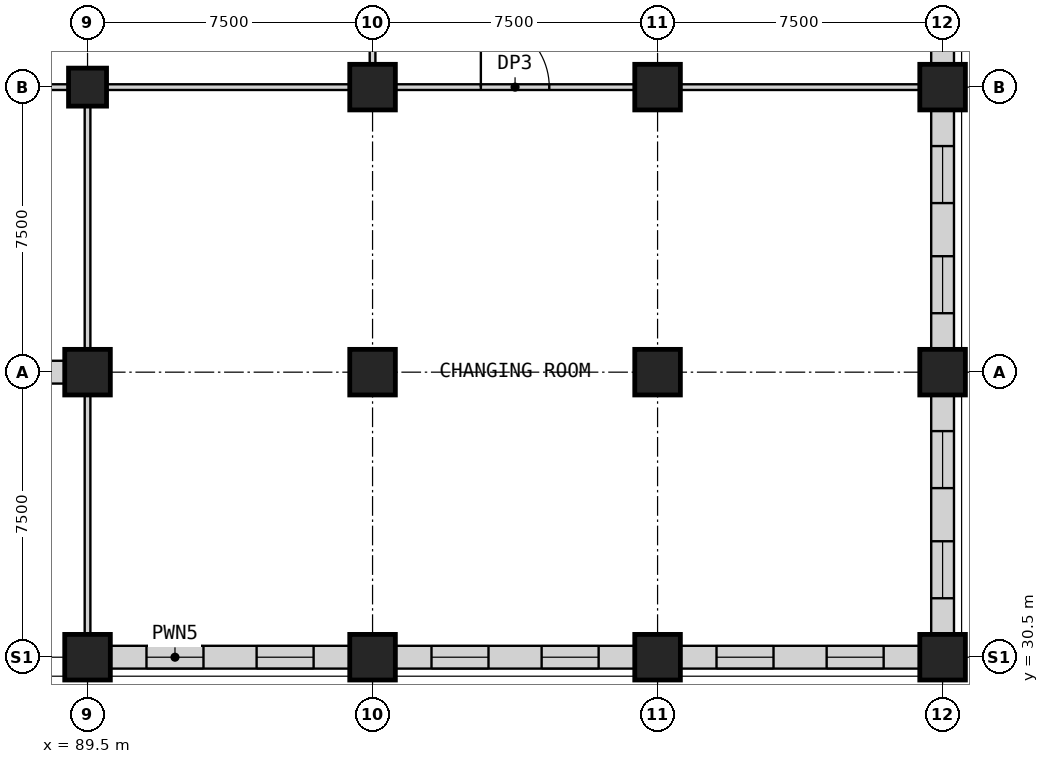
"""IFC4 building model, lengths in metres.
Left out: names, types, materials, properties, quantities, classifications, styles, units other than length and angle.
Written with IfcOpenShell. Run it as: python <this file> out.ifc"""

import sys

from ifc_helpers import new_model, si_unit, direction, frame, frame_2d, origin, origin_2d, place, context, subcontext, project, spatial, rectangle, extrude, element, fill, save


model = new_model("IFC4")
c1 = context("Model", 3, precision=1e-05, world=origin(), true_north=direction((0.0, 1.0)))
c2 = subcontext(c1, "Body", "Model", "MODEL_VIEW")
j1 = project(units=[si_unit("LENGTHUNIT", "METRE"), si_unit("PLANEANGLEUNIT", "RADIAN")], contexts=[c1])
p1 = place(None, origin())
s1 = spatial("IfcSite", under=j1, at=p1, CompositionType="ELEMENT")
p2 = place(p1, origin())
s2 = spatial("IfcBuilding", under=s1, at=p2, CompositionType="ELEMENT")
p3 = place(p2, frame((0.0, 0.0, 29.0)))
s3 = spatial("IfcBuildingStorey", under=s2, at=p3, CompositionType="ELEMENT", Elevation=29.0)
p4 = place(p3, frame((89.5, 45.5, 0.0), z_axis=(0.0, 0.0, 1.0), x_axis=(1.0, 0.0, 0.0)))
e1 = element("IfcColumn", 1, at=p4, inside=s3, PredefinedType="COLUMN", context=c2, shape_type="SweptSolid", body=[
    extrude(rectangle(XDim=1.0, YDim=1.0, at=origin_2d()), origin(), (0.0, 0.0, 1.0), 5.0),
])
for number, where, z_axis, x_axis in (
    (2, (89.5, 30.5, 0.0), (0.0, 0.0, 1.0), (1.0, 0.0, 0.0)),
    (3, (89.5, 38.0, 0.0), (0.0, 0.0, 1.0), (1.0, 0.0, 0.0)),
    (4, (97.0, 30.5, 0.0), (0.0, 0.0, 1.0), (1.0, 0.0, 0.0)),
    (5, (97.0, 38.0, 0.0), (0.0, 0.0, 1.0), (1.0, 0.0, 0.0)),
    (6, (97.0, 45.5, 0.0), (0.0, 0.0, 1.0), (1.0, 0.0, 0.0)),
    (7, (104.5, 30.5, 0.0), (0.0, 0.0, 1.0), (1.0, 0.0, 0.0)),
    (8, (104.5, 38.0, 0.0), (0.0, 0.0, 1.0), (1.0, 0.0, 0.0)),
    (9, (104.5, 45.5, 0.0), (0.0, 0.0, 1.0), (1.0, 0.0, 0.0)),
    (10, (112.0, 30.5, 0.0), (0.0, 0.0, 1.0), (1.0, 0.0, 0.0)),
    (11, (112.0, 38.0, 0.0), (0.0, 0.0, 1.0), (1.0, 0.0, 0.0)),
    (12, (112.0, 45.5, 0.0), (0.0, 0.0, 1.0), (1.0, 0.0, 0.0)),
):
    element("IfcColumn", number, at=place(p3, frame(where, z_axis=z_axis, x_axis=x_axis)), inside=s3, PredefinedType="COLUMN", context=c2, shape_type="SweptSolid", body=[
        extrude(rectangle(XDim=1.2, YDim=1.2, at=origin_2d()), origin(), (0.0, 0.0, 1.0), 5.0),
    ])
p5 = place(p3, frame((90.1, 30.5, 0.0), z_axis=(0.0, 0.0, 1.0), x_axis=(1.0, 0.0, 0.0)))
e13 = element("IfcWall", 13, at=p5, inside=s3, PredefinedType="PARTITIONING", context=c2, shape_type="SweptSolid", body=[
    extrude(rectangle(XDim=6.3, YDim=0.6, at=frame_2d((3.15, 0.0))), origin(), (0.0, 0.0, 1.0), 4.7),
])
p6 = place(p5, frame((0.951, 0.0, 0.9)))
e14 = element("IfcOpeningElement", 14, at=p6, cuts=e13, PredefinedType="OPENING", context=c2, shape_type="SweptSolid", body=[
    extrude(rectangle(XDim=1.5, YDim=2.8, at=frame_2d((0.75, 1.4))), frame((0.0, 0.31, 0.0), z_axis=(0.0, -1.0, 0.0), x_axis=(1.0, 0.0, 0.0)), (0.0, 0.0, 1.0), 0.62),
])
p7 = place(p5, frame((3.849, 0.0, 0.9)))
e15 = element("IfcOpeningElement", 15, at=p7, cuts=e13, PredefinedType="OPENING", context=c2, shape_type="SweptSolid", body=[
    extrude(rectangle(XDim=1.5, YDim=2.8, at=frame_2d((0.75, 1.4))), frame((0.0, 0.31, 0.0), z_axis=(0.0, -1.0, 0.0), x_axis=(1.0, 0.0, 0.0)), (0.0, 0.0, 1.0), 0.62),
])
p8 = place(p3, frame((97.6, 30.5, 0.0), z_axis=(0.0, 0.0, 1.0), x_axis=(1.0, 0.0, 0.0)))
e16 = element("IfcWall", 16, at=p8, inside=s3, PredefinedType="PARTITIONING", context=c2, shape_type="SweptSolid", body=[
    extrude(rectangle(XDim=6.3, YDim=0.6, at=frame_2d((3.15, 0.0))), origin(), (0.0, 0.0, 1.0), 4.7),
])
p9 = place(p8, frame((0.951, 0.0, 0.9)))
e17 = element("IfcOpeningElement", 17, at=p9, cuts=e16, PredefinedType="OPENING", context=c2, shape_type="SweptSolid", body=[
    extrude(rectangle(XDim=1.5, YDim=2.8, at=frame_2d((0.75, 1.4))), frame((0.0, 0.31, 0.0), z_axis=(0.0, -1.0, 0.0), x_axis=(1.0, 0.0, 0.0)), (0.0, 0.0, 1.0), 0.62),
])
p10 = place(p8, frame((3.849, 0.0, 0.9)))
e18 = element("IfcOpeningElement", 18, at=p10, cuts=e16, PredefinedType="OPENING", context=c2, shape_type="SweptSolid", body=[
    extrude(rectangle(XDim=1.5, YDim=2.8, at=frame_2d((0.75, 1.4))), frame((0.0, 0.31, 0.0), z_axis=(0.0, -1.0, 0.0), x_axis=(1.0, 0.0, 0.0)), (0.0, 0.0, 1.0), 0.62),
])
p11 = place(p3, frame((105.1, 30.5, 0.0), z_axis=(0.0, 0.0, 1.0), x_axis=(1.0, 0.0, 0.0)))
e19 = element("IfcWall", 19, at=p11, inside=s3, PredefinedType="PARTITIONING", context=c2, shape_type="SweptSolid", body=[
    extrude(rectangle(XDim=6.3, YDim=0.6, at=frame_2d((3.15, 0.0))), origin(), (0.0, 0.0, 1.0), 4.7),
])
p12 = place(p11, frame((0.951, 0.0, 0.9)))
e20 = element("IfcOpeningElement", 20, at=p12, cuts=e19, PredefinedType="OPENING", context=c2, shape_type="SweptSolid", body=[
    extrude(rectangle(XDim=1.5, YDim=2.8, at=frame_2d((0.75, 1.4))), frame((0.0, 0.31, 0.0), z_axis=(0.0, -1.0, 0.0), x_axis=(1.0, 0.0, 0.0)), (0.0, 0.0, 1.0), 0.62),
])
p13 = place(p11, frame((3.849, 0.0, 0.9)))
e21 = element("IfcOpeningElement", 21, at=p13, cuts=e19, PredefinedType="OPENING", context=c2, shape_type="SweptSolid", body=[
    extrude(rectangle(XDim=1.5, YDim=2.8, at=frame_2d((0.75, 1.4))), frame((0.0, 0.31, 0.0), z_axis=(0.0, -1.0, 0.0), x_axis=(1.0, 0.0, 0.0)), (0.0, 0.0, 1.0), 0.62),
])
for number, where, z_axis, x_axis in (
    (22, (82.6, 45.5, 0.0), (0.0, 0.0, 1.0), (1.0, 0.0, 0.0)),
    (23, (90.0, 45.5, 0.0), (0.0, 0.0, 1.0), (1.0, 0.0, 0.0)),
):
    element("IfcWall", number, at=place(p3, frame(where, z_axis=z_axis, x_axis=x_axis)), inside=s3, PredefinedType="PARTITIONING", context=c2, shape_type="SweptSolid", body=[
        extrude(rectangle(XDim=6.4, YDim=0.15, at=frame_2d((3.2, 0.0))), origin(), (0.0, 0.0, 1.0), 4.7),
    ])
p14 = place(p3, frame((97.6, 45.5, 0.0), z_axis=(0.0, 0.0, 1.0), x_axis=(1.0, 0.0, 0.0)))
e24 = element("IfcWall", 24, at=p14, inside=s3, PredefinedType="PARTITIONING", context=c2, shape_type="SweptSolid", body=[
    extrude(rectangle(XDim=6.3, YDim=0.15, at=frame_2d((3.15, 0.0))), origin(), (0.0, 0.0, 1.0), 4.7),
])
p15 = place(p14, frame((2.25, 0.0, 0.0)))
e25 = element("IfcOpeningElement", 25, at=p15, cuts=e24, PredefinedType="OPENING", context=c2, shape_type="SweptSolid", body=[
    extrude(rectangle(XDim=1.8, YDim=2.4, at=frame_2d((0.9, 1.2))), frame((0.0, 0.085, 0.0), z_axis=(0.0, -1.0, 0.0), x_axis=(1.0, 0.0, 0.0)), (0.0, 0.0, 1.0), 0.17),
])
p16 = place(p3, frame((105.1, 45.5, 0.0), z_axis=(0.0, 0.0, 1.0), x_axis=(1.0, 0.0, 0.0)))
e26 = element("IfcWall", 26, at=p16, inside=s3, PredefinedType="PARTITIONING", context=c2, shape_type="SweptSolid", body=[
    extrude(rectangle(XDim=6.3, YDim=0.15, at=frame_2d((3.15, 0.0))), origin(), (0.0, 0.0, 1.0), 4.7),
])
p17 = place(p3, frame((82.5, 38.0, 0.0), z_axis=(0.0, 0.0, 1.0), x_axis=(1.0, 0.0, 0.0)))
e27 = element("IfcWall", 27, at=p17, inside=s3, PredefinedType="PARTITIONING", context=c2, shape_type="SweptSolid", body=[
    extrude(rectangle(XDim=6.4, YDim=0.6, at=frame_2d((3.2, 0.0))), origin(), (0.0, 0.0, 1.0), 4.7),
])
p18 = place(p17, frame((0.978, 0.0, 0.9)))
e28 = element("IfcOpeningElement", 28, at=p18, cuts=e27, PredefinedType="OPENING", context=c2, shape_type="SweptSolid", body=[
    extrude(rectangle(XDim=1.5, YDim=2.8, at=frame_2d((0.75, 1.4))), frame((0.0, 0.31, 0.0), z_axis=(0.0, -1.0, 0.0), x_axis=(1.0, 0.0, 0.0)), (0.0, 0.0, 1.0), 0.62),
])
p19 = place(p17, frame((3.922, 0.0, 0.9)))
e29 = element("IfcOpeningElement", 29, at=p19, cuts=e27, PredefinedType="OPENING", context=c2, shape_type="SweptSolid", body=[
    extrude(rectangle(XDim=1.5, YDim=2.8, at=frame_2d((0.75, 1.4))), frame((0.0, 0.31, 0.0), z_axis=(0.0, -1.0, 0.0), x_axis=(1.0, 0.0, 0.0)), (0.0, 0.0, 1.0), 0.62),
])
p20 = place(p3, frame((97.0, 46.1, 0.0), z_axis=(0.0, 0.0, 1.0), x_axis=(0.0, 1.0, 0.0)))
e30 = element("IfcWall", 30, at=p20, inside=s3, PredefinedType="PARTITIONING", context=c2, shape_type="SweptSolid", body=[
    extrude(rectangle(XDim=5.8, YDim=0.15, at=frame_2d((2.9, 0.0))), origin(), (0.0, 0.0, 1.0), 4.7),
])
p21 = place(p20, frame((2.5, 0.0, 0.0)))
e31 = element("IfcOpeningElement", 31, at=p21, cuts=e30, PredefinedType="OPENING", context=c2, shape_type="SweptSolid", body=[
    extrude(rectangle(XDim=1.0, YDim=2.1, at=frame_2d((0.5, 1.05))), frame((0.0, 0.085, 0.0), z_axis=(0.0, -1.0, 0.0), x_axis=(1.0, 0.0, 0.0)), (0.0, 0.0, 1.0), 0.17),
])
p22 = place(p3, frame((112.0, 31.1, 0.0), z_axis=(0.0, 0.0, 1.0), x_axis=(0.0, 1.0, 0.0)))
e32 = element("IfcWall", 32, at=p22, inside=s3, PredefinedType="PARTITIONING", context=c2, shape_type="SweptSolid", body=[
    extrude(rectangle(XDim=6.3, YDim=0.6, at=frame_2d((3.15, 0.0))), origin(), (0.0, 0.0, 1.0), 4.7),
])
p23 = place(p22, frame((0.951, 0.0, 0.9)))
e33 = element("IfcOpeningElement", 33, at=p23, cuts=e32, PredefinedType="OPENING", context=c2, shape_type="SweptSolid", body=[
    extrude(rectangle(XDim=1.5, YDim=2.8, at=frame_2d((0.75, 1.4))), frame((0.0, 0.31, 0.0), z_axis=(0.0, -1.0, 0.0), x_axis=(1.0, 0.0, 0.0)), (0.0, 0.0, 1.0), 0.62),
])
p24 = place(p22, frame((3.849, 0.0, 0.9)))
e34 = element("IfcOpeningElement", 34, at=p24, cuts=e32, PredefinedType="OPENING", context=c2, shape_type="SweptSolid", body=[
    extrude(rectangle(XDim=1.5, YDim=2.8, at=frame_2d((0.75, 1.4))), frame((0.0, 0.31, 0.0), z_axis=(0.0, -1.0, 0.0), x_axis=(1.0, 0.0, 0.0)), (0.0, 0.0, 1.0), 0.62),
])
p25 = place(p3, frame((112.0, 38.6, 0.0), z_axis=(0.0, 0.0, 1.0), x_axis=(0.0, 1.0, 0.0)))
e35 = element("IfcWall", 35, at=p25, inside=s3, PredefinedType="PARTITIONING", context=c2, shape_type="SweptSolid", body=[
    extrude(rectangle(XDim=6.3, YDim=0.6, at=frame_2d((3.15, 0.0))), origin(), (0.0, 0.0, 1.0), 4.7),
])
p26 = place(p25, frame((0.951, 0.0, 0.9)))
e36 = element("IfcOpeningElement", 36, at=p26, cuts=e35, PredefinedType="OPENING", context=c2, shape_type="SweptSolid", body=[
    extrude(rectangle(XDim=1.5, YDim=2.8, at=frame_2d((0.75, 1.4))), frame((0.0, 0.31, 0.0), z_axis=(0.0, -1.0, 0.0), x_axis=(1.0, 0.0, 0.0)), (0.0, 0.0, 1.0), 0.62),
])
p27 = place(p25, frame((3.849, 0.0, 0.9)))
e37 = element("IfcOpeningElement", 37, at=p27, cuts=e35, PredefinedType="OPENING", context=c2, shape_type="SweptSolid", body=[
    extrude(rectangle(XDim=1.5, YDim=2.8, at=frame_2d((0.75, 1.4))), frame((0.0, 0.31, 0.0), z_axis=(0.0, -1.0, 0.0), x_axis=(1.0, 0.0, 0.0)), (0.0, 0.0, 1.0), 0.62),
])
p28 = place(p3, frame((112.0, 46.1, 0.0), z_axis=(0.0, 0.0, 1.0), x_axis=(0.0, 1.0, 0.0)))
e38 = element("IfcWall", 38, at=p28, inside=s3, PredefinedType="PARTITIONING", context=c2, shape_type="SweptSolid", body=[
    extrude(rectangle(XDim=5.8, YDim=0.6, at=frame_2d((2.9, 0.0))), origin(), (0.0, 0.0, 1.0), 4.7),
])
p29 = place(p28, frame((0.816, 0.0, 0.9)))
e39 = element("IfcOpeningElement", 39, at=p29, cuts=e38, PredefinedType="OPENING", context=c2, shape_type="SweptSolid", body=[
    extrude(rectangle(XDim=1.5, YDim=2.8, at=frame_2d((0.75, 1.4))), frame((0.0, 0.31, 0.0), z_axis=(0.0, -1.0, 0.0), x_axis=(1.0, 0.0, 0.0)), (0.0, 0.0, 1.0), 0.62),
])
p30 = place(p28, frame((3.484, 0.0, 0.9)))
e40 = element("IfcOpeningElement", 40, at=p30, cuts=e38, PredefinedType="OPENING", context=c2, shape_type="SweptSolid", body=[
    extrude(rectangle(XDim=1.5, YDim=2.8, at=frame_2d((0.75, 1.4))), frame((0.0, 0.31, 0.0), z_axis=(0.0, -1.0, 0.0), x_axis=(1.0, 0.0, 0.0)), (0.0, 0.0, 1.0), 0.62),
])
p31 = place(p3, frame((89.5, 31.1, 0.0), z_axis=(0.0, 0.0, 1.0), x_axis=(0.0, 1.0, 0.0)))
e41 = element("IfcWall", 41, at=p31, inside=s3, PredefinedType="PARTITIONING", context=c2, shape_type="SweptSolid", body=[
    extrude(rectangle(XDim=6.3, YDim=0.15, at=frame_2d((3.15, 0.0))), origin(), (0.0, 0.0, 1.0), 4.7),
])
p32 = place(p3, frame((89.5, 38.6, 0.0), z_axis=(0.0, 0.0, 1.0), x_axis=(0.0, 1.0, 0.0)))
e42 = element("IfcWall", 42, at=p32, inside=s3, PredefinedType="PARTITIONING", context=c2, shape_type="SweptSolid", body=[
    extrude(rectangle(XDim=6.4, YDim=0.15, at=frame_2d((3.2, 0.0))), origin(), (0.0, 0.0, 1.0), 4.7),
])
p33 = place(p6, origin())
e43 = element("IfcWindow", 43, at=p33, inside=s3, PartitioningType="SINGLE_PANEL", PredefinedType="WINDOW", context=c2, shape_type="SweptSolid", body=[
    extrude(rectangle(XDim=1.5, YDim=2.8, at=frame_2d((0.75, 1.4))), frame((0.0, 0.03, 0.0), z_axis=(0.0, -1.0, 0.0), x_axis=(1.0, 0.0, 0.0)), (0.0, 0.0, 1.0), 0.06),
])
fill(e14, e43)
p34 = place(p7, origin())
e44 = element("IfcWindow", 44, at=p34, inside=s3, PartitioningType="SINGLE_PANEL", PredefinedType="WINDOW", context=c2, shape_type="SweptSolid", body=[
    extrude(rectangle(XDim=1.5, YDim=2.8, at=frame_2d((0.75, 1.4))), frame((0.0, 0.03, 0.0), z_axis=(0.0, -1.0, 0.0), x_axis=(1.0, 0.0, 0.0)), (0.0, 0.0, 1.0), 0.06),
])
fill(e15, e44)
p35 = place(p9, origin())
e45 = element("IfcWindow", 45, at=p35, inside=s3, PartitioningType="SINGLE_PANEL", PredefinedType="WINDOW", context=c2, shape_type="SweptSolid", body=[
    extrude(rectangle(XDim=1.5, YDim=2.8, at=frame_2d((0.75, 1.4))), frame((0.0, 0.03, 0.0), z_axis=(0.0, -1.0, 0.0), x_axis=(1.0, 0.0, 0.0)), (0.0, 0.0, 1.0), 0.06),
])
fill(e17, e45)
p36 = place(p10, origin())
e46 = element("IfcWindow", 46, at=p36, inside=s3, PartitioningType="SINGLE_PANEL", PredefinedType="WINDOW", context=c2, shape_type="SweptSolid", body=[
    extrude(rectangle(XDim=1.5, YDim=2.8, at=frame_2d((0.75, 1.4))), frame((0.0, 0.03, 0.0), z_axis=(0.0, -1.0, 0.0), x_axis=(1.0, 0.0, 0.0)), (0.0, 0.0, 1.0), 0.06),
])
fill(e18, e46)
p37 = place(p12, origin())
e47 = element("IfcWindow", 47, at=p37, inside=s3, PartitioningType="SINGLE_PANEL", PredefinedType="WINDOW", context=c2, shape_type="SweptSolid", body=[
    extrude(rectangle(XDim=1.5, YDim=2.8, at=frame_2d((0.75, 1.4))), frame((0.0, 0.03, 0.0), z_axis=(0.0, -1.0, 0.0), x_axis=(1.0, 0.0, 0.0)), (0.0, 0.0, 1.0), 0.06),
])
fill(e20, e47)
p38 = place(p13, origin())
e48 = element("IfcWindow", 48, at=p38, inside=s3, PartitioningType="SINGLE_PANEL", PredefinedType="WINDOW", context=c2, shape_type="SweptSolid", body=[
    extrude(rectangle(XDim=1.5, YDim=2.8, at=frame_2d((0.75, 1.4))), frame((0.0, 0.03, 0.0), z_axis=(0.0, -1.0, 0.0), x_axis=(1.0, 0.0, 0.0)), (0.0, 0.0, 1.0), 0.06),
])
fill(e21, e48)
p39 = place(p15, origin())
e49 = element("IfcDoor", 49, at=p39, inside=s3, OperationType="SINGLE_SWING_LEFT", PredefinedType="DOOR", context=c2, shape_type="SweptSolid", body=[
    extrude(rectangle(XDim=1.8, YDim=2.4, at=frame_2d((0.9, 1.2))), frame((0.0, 0.025, 0.0), z_axis=(0.0, -1.0, 0.0), x_axis=(1.0, 0.0, 0.0)), (0.0, 0.0, 1.0), 0.05),
])
fill(e25, e49)
p40 = place(p23, origin())
e50 = element("IfcWindow", 50, at=p40, inside=s3, PartitioningType="SINGLE_PANEL", PredefinedType="WINDOW", context=c2, shape_type="SweptSolid", body=[
    extrude(rectangle(XDim=1.5, YDim=2.8, at=frame_2d((0.75, 1.4))), frame((0.0, 0.03, 0.0), z_axis=(0.0, -1.0, 0.0), x_axis=(1.0, 0.0, 0.0)), (0.0, 0.0, 1.0), 0.06),
])
fill(e33, e50)
p41 = place(p24, origin())
e51 = element("IfcWindow", 51, at=p41, inside=s3, PartitioningType="SINGLE_PANEL", PredefinedType="WINDOW", context=c2, shape_type="SweptSolid", body=[
    extrude(rectangle(XDim=1.5, YDim=2.8, at=frame_2d((0.75, 1.4))), frame((0.0, 0.03, 0.0), z_axis=(0.0, -1.0, 0.0), x_axis=(1.0, 0.0, 0.0)), (0.0, 0.0, 1.0), 0.06),
])
fill(e34, e51)
p42 = place(p26, origin())
e52 = element("IfcWindow", 52, at=p42, inside=s3, PartitioningType="SINGLE_PANEL", PredefinedType="WINDOW", context=c2, shape_type="SweptSolid", body=[
    extrude(rectangle(XDim=1.5, YDim=2.8, at=frame_2d((0.75, 1.4))), frame((0.0, 0.03, 0.0), z_axis=(0.0, -1.0, 0.0), x_axis=(1.0, 0.0, 0.0)), (0.0, 0.0, 1.0), 0.06),
])
fill(e36, e52)
p43 = place(p27, origin())
e53 = element("IfcWindow", 53, at=p43, inside=s3, PartitioningType="SINGLE_PANEL", PredefinedType="WINDOW", context=c2, shape_type="SweptSolid", body=[
    extrude(rectangle(XDim=1.5, YDim=2.8, at=frame_2d((0.75, 1.4))), frame((0.0, 0.03, 0.0), z_axis=(0.0, -1.0, 0.0), x_axis=(1.0, 0.0, 0.0)), (0.0, 0.0, 1.0), 0.06),
])
fill(e37, e53)
save(model, sys.argv[1])
